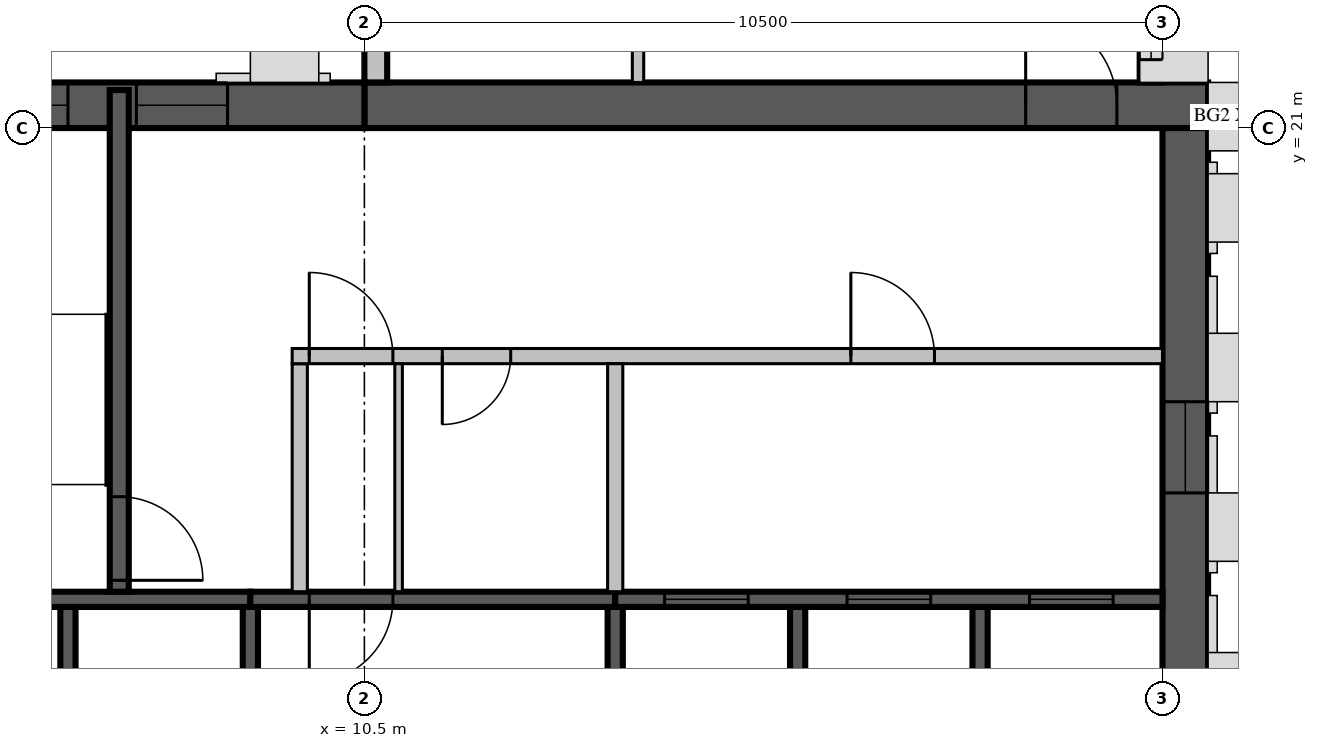
"""IFC4 building model, lengths in metres.
Left out: names, types, materials, properties, quantities, classifications, styles, units other than length and angle.
Written with IfcOpenShell. Run it as: python <this file> out.ifc"""

import sys

from ifc_helpers import new_model, si_unit, direction, frame, frame_2d, origin, place, context, subcontext, project, spatial, rectangle, extrude, source, transform, mapped, element, fill, save


model = new_model("IFC4")
c1 = context("Model", 3, precision=1e-05, world=origin(), true_north=direction((0.0, 1.0)))
c2 = subcontext(c1, "Body", "Model", "MODEL_VIEW")
j1 = project(units=[si_unit("LENGTHUNIT", "METRE"), si_unit("PLANEANGLEUNIT", "RADIAN")], contexts=[c1])
p1 = place(None, origin())
s1 = spatial("IfcSite", under=j1, at=p1, CompositionType="ELEMENT")
p2 = place(p1, origin())
s2 = spatial("IfcBuilding", under=s1, at=p2, CompositionType="ELEMENT")
p3 = place(p2, frame((0.0, 0.0, 347.5)))
s3 = spatial("IfcBuildingStorey", under=s2, at=p3, CompositionType="ELEMENT", Elevation=347.5)
m1 = source(origin(), c2, "Body", "SweptSolid", [
    extrude(rectangle(XDim=11.1, YDim=0.6, at=frame_2d((5.55, 0.0))), origin(), (0.0, 0.0, 1.0), 3.5),
])
p4 = place(p3, frame((10.5, 21.3, 0.0), z_axis=(0.0, 0.0, 1.0), x_axis=(1.0, 0.0, 0.0)))
e1 = element("IfcWall", 1, at=p4, inside=s3, PredefinedType="SHEAR", context=c2, shape_type="MappedRepresentation", body=[
    mapped(m1, transform((0.0, 0.0, 0.0), scale=1.0)),
])
m2 = source(origin(), c2, "Body", "SweptSolid", [
    extrude(rectangle(XDim=1.2, YDim=2.1, at=frame_2d((0.6, 1.05))), frame((0.0, 0.31, 0.0), z_axis=(0.0, -1.0, 0.0), x_axis=(1.0, 0.0, 0.0)), (0.0, 0.0, 1.0), 0.62),
])
p5 = place(p4, frame((8.7, 0.0, 0.0)))
e2 = element("IfcOpeningElement", 2, at=p5, cuts=e1, PredefinedType="OPENING", context=c2, shape_type="MappedRepresentation", body=[
    mapped(m2, transform((0.0, 0.0, 0.0), scale=1.0)),
])
m3 = source(origin(), c2, "Body", "SweptSolid", [
    extrude(rectangle(XDim=16.8, YDim=0.6, at=frame_2d((8.4, 0.0))), origin(), (0.0, 0.0, 1.0), 3.5),
])
p6 = place(p3, frame((21.3, 4.2, 0.0), z_axis=(0.0, 0.0, 1.0), x_axis=(0.0, 1.0, 0.0)))
e3 = element("IfcWall", 3, at=p6, inside=s3, PredefinedType="SHEAR", context=c2, shape_type="MappedRepresentation", body=[
    mapped(m3, transform((0.0, 0.0, 0.0), scale=1.0)),
])
p7 = place(p6, frame((4.2, 0.0, 0.0)))
e4 = element("IfcOpeningElement", 4, at=p7, cuts=e3, PredefinedType="OPENING", context=c2, shape_type="MappedRepresentation", body=[
    mapped(m2, transform((0.0, 0.0, 0.0), scale=1.0)),
])
m4 = source(origin(), c2, "Body", "SweptSolid", [
    extrude(rectangle(XDim=1.2, YDim=2.4, at=frame_2d((0.6, 1.2))), frame((0.0, 0.31, 0.0), z_axis=(0.0, -1.0, 0.0), x_axis=(1.0, 0.0, 0.0)), (0.0, 0.0, 1.0), 0.62),
])
p8 = place(p6, frame((12.0, 0.0, 0.6)))
e5 = element("IfcOpeningElement", 5, at=p8, cuts=e3, PredefinedType="OPENING", context=c2, shape_type="MappedRepresentation", body=[
    mapped(m4, transform((0.0, 0.0, 0.0), scale=1.0)),
])
m5 = source(origin(), c2, "Body", "SweptSolid", [
    extrude(rectangle(XDim=6.6, YDim=0.6, at=frame_2d((3.3, 0.0))), origin(), (0.0, 0.0, 1.0), 3.5),
])
p9 = place(p3, frame((3.9, 21.3, 0.0), z_axis=(0.0, 0.0, 1.0), x_axis=(1.0, 0.0, 0.0)))
e6 = element("IfcWall", 6, at=p9, inside=s3, PredefinedType="SHEAR", context=c2, shape_type="MappedRepresentation", body=[
    mapped(m5, transform((0.0, 0.0, 0.0), scale=1.0)),
])
p10 = place(p9, frame((1.5, 0.0, 0.6)))
e7 = element("IfcOpeningElement", 7, at=p10, cuts=e6, PredefinedType="OPENING", context=c2, shape_type="MappedRepresentation", body=[
    mapped(m4, transform((0.0, 0.0, 0.0), scale=1.0)),
])
p11 = place(p9, frame((3.6, 0.0, 0.6)))
e8 = element("IfcOpeningElement", 8, at=p11, cuts=e6, PredefinedType="OPENING", context=c2, shape_type="MappedRepresentation", body=[
    mapped(m4, transform((0.0, 0.0, 0.0), scale=1.0)),
])
m6 = source(origin(), c2, "Body", "SweptSolid", [
    extrude(rectangle(XDim=7.5, YDim=0.3, at=frame_2d((3.75, 0.0))), origin(), (0.0, 0.0, 1.0), 3.1),
])
p12 = place(p3, frame((20.85, 21.6, 0.0), z_axis=(0.0, 0.0, 1.0), x_axis=(0.0, 1.0, 0.0)))
e9 = element("IfcWall", 9, at=p12, inside=s3, PredefinedType="STANDARD", context=c2, shape_type="MappedRepresentation", body=[
    mapped(m6, transform((0.0, 0.0, 0.0), scale=1.0)),
])
m7 = source(origin(), c2, "Body", "SweptSolid", [
    extrude(rectangle(XDim=2.4, YDim=2.0, at=frame_2d((1.2, 1.0))), frame((0.0, 0.16, 0.0), z_axis=(0.0, -1.0, 0.0), x_axis=(1.0, 0.0, 0.0)), (0.0, 0.0, 1.0), 0.32),
])
p13 = place(p12, frame((0.3, 0.0, 0.6)))
e10 = element("IfcOpeningElement", 10, at=p13, cuts=e9, PredefinedType="OPENING", context=c2, shape_type="MappedRepresentation", body=[
    mapped(m7, transform((0.0, 0.0, 0.0), scale=1.0)),
])
m8 = source(origin(), c2, "Body", "SweptSolid", [
    extrude(rectangle(XDim=3.0, YDim=2.0, at=frame_2d((1.5, 1.0))), frame((0.0, 0.16, 0.0), z_axis=(0.0, -1.0, 0.0), x_axis=(1.0, 0.0, 0.0)), (0.0, 0.0, 1.0), 0.32),
])
p14 = place(p12, frame((4.2, 0.0, 0.6)))
e11 = element("IfcOpeningElement", 11, at=p14, cuts=e9, PredefinedType="OPENING", context=c2, shape_type="MappedRepresentation", body=[
    mapped(m8, transform((0.0, 0.0, 0.0), scale=1.0)),
])
p15 = place(p3, frame((10.65, 29.1, 0.0), z_axis=(0.0, 0.0, 1.0), x_axis=(0.0, -1.0, 0.0)))
e12 = element("IfcWall", 12, at=p15, inside=s3, PredefinedType="STANDARD", context=c2, shape_type="MappedRepresentation", body=[
    mapped(m6, transform((0.0, 0.0, 0.0), scale=1.0)),
])
m9 = source(origin(), c2, "Body", "SweptSolid", [
    extrude(rectangle(XDim=3.6, YDim=2.0, at=frame_2d((1.8, 1.0))), frame((0.0, 0.16, 0.0), z_axis=(0.0, -1.0, 0.0), x_axis=(1.0, 0.0, 0.0)), (0.0, 0.0, 1.0), 0.32),
])
p16 = place(p15, frame((3.36, 0.0, 0.6)))
e13 = element("IfcOpeningElement", 13, at=p16, cuts=e12, PredefinedType="OPENING", context=c2, shape_type="MappedRepresentation", body=[
    mapped(m9, transform((0.0, 0.0, 0.0), scale=1.0)),
])
p17 = place(p15, frame((0.48, 0.0, 0.6)))
e14 = element("IfcOpeningElement", 14, at=p17, cuts=e12, PredefinedType="OPENING", context=c2, shape_type="MappedRepresentation", body=[
    mapped(m7, transform((0.0, 0.0, 0.0), scale=1.0)),
])
m10 = source(origin(), c2, "Body", "SweptSolid", [
    extrude(rectangle(XDim=3.0, YDim=0.2, at=frame_2d((1.5, 0.0))), origin(), (0.0, 0.0, 1.0), 3.5),
])
p18 = place(p3, frame((6.6, 11.7, 0.0), z_axis=(0.0, 0.0, 1.0), x_axis=(0.0, 1.0, 0.0)))
e15 = element("IfcWall", 15, at=p18, inside=s3, PredefinedType="SOLIDWALL", context=c2, shape_type="MappedRepresentation", body=[
    mapped(m10, transform((0.0, 0.0, 0.0), scale=1.0)),
])
m11 = source(origin(), c2, "Body", "SweptSolid", [
    extrude(rectangle(XDim=3.0, YDim=0.2, at=frame_2d((1.5, 0.0))), origin(), (0.0, 0.0, 1.0), 3.1),
])
for number, where, z_axis, x_axis in (
    (16, (9.0, 11.7, 0.0), (0.0, 0.0, 1.0), (0.0, 1.0, 0.0)),
    (17, (13.8, 11.7, 0.0), (0.0, 0.0, 1.0), (0.0, 1.0, 0.0)),
):
    element("IfcWall", number, at=place(p3, frame(where, z_axis=z_axis, x_axis=x_axis)), inside=s3, PredefinedType="SOLIDWALL", context=c2, shape_type="MappedRepresentation", body=[
        mapped(m11, transform((0.0, 0.0, 0.0), scale=1.0)),
    ])
for number, where, z_axis, x_axis in (
    (18, (16.2, 11.7, 0.0), (0.0, 0.0, 1.0), (0.0, 1.0, 0.0)),
    (19, (18.6, 11.7, 0.0), (0.0, 0.0, 1.0), (0.0, 1.0, 0.0)),
):
    element("IfcWall", number, at=place(p3, frame(where, z_axis=z_axis, x_axis=x_axis)), inside=s3, PredefinedType="SOLIDWALL", context=c2, shape_type="MappedRepresentation", body=[
        mapped(m10, transform((0.0, 0.0, 0.0), scale=1.0)),
    ])
m12 = source(origin(), c2, "Body", "SweptSolid", [
    extrude(rectangle(XDim=4.8, YDim=0.2, at=frame_2d((2.4, 0.0))), origin(), (0.0, 0.0, 1.0), 3.5),
])
p19 = place(p3, frame((4.2, 14.8, 0.0), z_axis=(0.0, 0.0, 1.0), x_axis=(1.0, 0.0, 0.0)))
e20 = element("IfcWall", 20, at=p19, inside=s3, PredefinedType="SOLIDWALL", context=c2, shape_type="MappedRepresentation", body=[
    mapped(m12, transform((0.0, 0.0, 0.0), scale=1.0)),
])
m13 = source(origin(), c2, "Body", "SweptSolid", [
    extrude(rectangle(XDim=4.8, YDim=0.2, at=frame_2d((2.4, 0.0))), origin(), (0.0, 0.0, 1.0), 3.1),
])
p20 = place(p3, frame((9.0, 14.8, 0.0), z_axis=(0.0, 0.0, 1.0), x_axis=(1.0, 0.0, 0.0)))
e21 = element("IfcWall", 21, at=p20, inside=s3, PredefinedType="SOLIDWALL", context=c2, shape_type="MappedRepresentation", body=[
    mapped(m13, transform((0.0, 0.0, 0.0), scale=1.0)),
])
m14 = source(origin(), c2, "Body", "SweptSolid", [
    extrude(rectangle(XDim=1.1, YDim=2.1, at=frame_2d((0.55, 1.05))), frame((0.0, 0.11, 0.0), z_axis=(0.0, -1.0, 0.0), x_axis=(1.0, 0.0, 0.0)), (0.0, 0.0, 1.0), 0.22),
])
p21 = place(p20, frame((0.775, 0.0, 0.0)))
e22 = element("IfcOpeningElement", 22, at=p21, cuts=e21, PredefinedType="OPENING", context=c2, shape_type="MappedRepresentation", body=[
    mapped(m14, transform((0.0, 0.0, 0.0), scale=1.0)),
])
m15 = source(origin(), c2, "Body", "SweptSolid", [
    extrude(rectangle(XDim=7.2, YDim=0.2, at=frame_2d((3.6, 0.0))), origin(), (0.0, 0.0, 1.0), 3.5),
])
p22 = place(p3, frame((13.8, 14.8, 0.0), z_axis=(0.0, 0.0, 1.0), x_axis=(1.0, 0.0, 0.0)))
e23 = element("IfcWall", 23, at=p22, inside=s3, PredefinedType="SOLIDWALL", context=c2, shape_type="MappedRepresentation", body=[
    mapped(m15, transform((0.0, 0.0, 0.0), scale=1.0)),
])
p23 = place(p22, frame((0.65, 0.0, 0.0)))
e24 = element("IfcOpeningElement", 24, at=p23, cuts=e23, PredefinedType="OPENING", context=c2, shape_type="MappedRepresentation", body=[
    mapped(m14, transform((0.0, 0.0, 0.0), scale=1.0)),
])
p24 = place(p22, frame((3.05, 0.0, 0.0)))
e25 = element("IfcOpeningElement", 25, at=p24, cuts=e23, PredefinedType="OPENING", context=c2, shape_type="MappedRepresentation", body=[
    mapped(m14, transform((0.0, 0.0, 0.0), scale=1.0)),
])
p25 = place(p22, frame((5.45, 0.0, 0.0)))
e26 = element("IfcOpeningElement", 26, at=p25, cuts=e23, PredefinedType="OPENING", context=c2, shape_type="MappedRepresentation", body=[
    mapped(m14, transform((0.0, 0.0, 0.0), scale=1.0)),
])
m16 = source(origin(), c2, "Body", "SweptSolid", [
    extrude(rectangle(XDim=6.6, YDim=0.25, at=frame_2d((3.3, 0.0))), origin(), (0.0, 0.0, 1.0), 3.1),
])
p26 = place(p3, frame((7.275, 14.9, 0.0), z_axis=(0.0, 0.0, 1.0), x_axis=(0.0, 1.0, 0.0)))
e27 = element("IfcWall", 27, at=p26, inside=s3, PredefinedType="SOLIDWALL", context=c2, shape_type="MappedRepresentation", body=[
    mapped(m16, transform((0.0, 0.0, 0.0), scale=1.0)),
])
m17 = source(origin(), c2, "Body", "SweptSolid", [
    extrude(rectangle(XDim=1.1, YDim=2.1, at=frame_2d((0.55, 1.05))), frame((0.0, 0.135, 0.0), z_axis=(0.0, -1.0, 0.0), x_axis=(1.0, 0.0, 0.0)), (0.0, 0.0, 1.0), 0.27),
])
p27 = place(p26, frame((0.15, 0.0, 0.0)))
e28 = element("IfcOpeningElement", 28, at=p27, cuts=e27, PredefinedType="OPENING", context=c2, shape_type="MappedRepresentation", body=[
    mapped(m17, transform((0.0, 0.0, 0.0), scale=1.0)),
])
m18 = source(origin(), c2, "Body", "SweptSolid", [
    extrude(rectangle(XDim=3.0, YDim=0.2, at=frame_2d((1.5, 0.0))), origin(), (0.0, 0.0, 1.0), 3.1),
])
p28 = place(p3, frame((9.65, 14.9, 0.0), z_axis=(0.0, 0.0, 1.0), x_axis=(0.0, 1.0, 0.0)))
e29 = element("IfcWall", 29, at=p28, inside=s3, PredefinedType="PARTITIONING", context=c2, shape_type="MappedRepresentation", body=[
    mapped(m18, transform((0.0, 0.0, 0.0), scale=1.0)),
])
m19 = source(origin(), c2, "Body", "SweptSolid", [
    extrude(rectangle(XDim=11.45, YDim=0.2, at=frame_2d((5.725, 0.0))), origin(), (0.0, 0.0, 1.0), 3.1),
])
p29 = place(p3, frame((9.55, 18.0, 0.0), z_axis=(0.0, 0.0, 1.0), x_axis=(1.0, 0.0, 0.0)))
e30 = element("IfcWall", 30, at=p29, inside=s3, PredefinedType="PARTITIONING", context=c2, shape_type="MappedRepresentation", body=[
    mapped(m19, transform((0.0, 0.0, 0.0), scale=1.0)),
])
p30 = place(p29, frame((0.225, 0.0, 0.0)))
e31 = element("IfcOpeningElement", 31, at=p30, cuts=e30, PredefinedType="OPENING", context=c2, shape_type="MappedRepresentation", body=[
    mapped(m14, transform((0.0, 0.0, 0.0), scale=1.0)),
])
m20 = source(origin(), c2, "Body", "SweptSolid", [
    extrude(rectangle(XDim=0.9, YDim=2.1, at=frame_2d((0.45, 1.05))), frame((0.0, 0.11, 0.0), z_axis=(0.0, -1.0, 0.0), x_axis=(1.0, 0.0, 0.0)), (0.0, 0.0, 1.0), 0.22),
])
p31 = place(p29, frame((1.975, 0.0, 0.0)))
e32 = element("IfcOpeningElement", 32, at=p31, cuts=e30, PredefinedType="OPENING", context=c2, shape_type="MappedRepresentation", body=[
    mapped(m20, transform((0.0, 0.0, 0.0), scale=1.0)),
])
p32 = place(p29, frame((7.35, 0.0, 0.0)))
e33 = element("IfcOpeningElement", 33, at=p32, cuts=e30, PredefinedType="OPENING", context=c2, shape_type="MappedRepresentation", body=[
    mapped(m14, transform((0.0, 0.0, 0.0), scale=1.0)),
])
p33 = place(p3, frame((13.8, 14.9, 0.0), z_axis=(0.0, 0.0, 1.0), x_axis=(0.0, 1.0, 0.0)))
e34 = element("IfcWall", 34, at=p33, inside=s3, PredefinedType="PARTITIONING", context=c2, shape_type="MappedRepresentation", body=[
    mapped(m18, transform((0.0, 0.0, 0.0), scale=1.0)),
])
m21 = source(origin(), c2, "Body", "SweptSolid", [
    extrude(rectangle(XDim=3.0, YDim=0.1, at=frame_2d((1.5, 0.0))), origin(), (0.0, 0.0, 1.0), 3.1),
])
p34 = place(p3, frame((10.95, 14.9, 0.0), z_axis=(0.0, 0.0, 1.0), x_axis=(0.0, 1.0, 0.0)))
e35 = element("IfcWall", 35, at=p34, inside=s3, PredefinedType="PARTITIONING", context=c2, shape_type="MappedRepresentation", body=[
    mapped(m21, transform((0.0, 0.0, 0.0), scale=1.0)),
])
m22 = source(origin(), c2, "Body", "SweptSolid", [
    extrude(rectangle(XDim=7.725, YDim=0.15, at=frame_2d((3.862, 0.0))), origin(), (0.0, 0.0, 1.0), 3.1),
])
p35 = place(p3, frame((14.1, 29.325, 0.0), z_axis=(0.0, 0.0, 1.0), x_axis=(0.0, -1.0, 0.0)))
e36 = element("IfcWall", 36, at=p35, inside=s3, PredefinedType="PARTITIONING", context=c2, shape_type="MappedRepresentation", body=[
    mapped(m22, transform((0.0, 0.0, 0.0), scale=1.0)),
])
m23 = source(origin(), c2, "Body", "SweptSolid", [
    extrude(rectangle(XDim=2.2, YDim=2.1, at=frame_2d((1.1, 1.05))), frame((0.0, 0.085, 0.0), z_axis=(0.0, -1.0, 0.0), x_axis=(1.0, 0.0, 0.0)), (0.0, 0.0, 1.0), 0.17),
])
p36 = place(p35, frame((4.925, 0.0, 0.0)))
e37 = element("IfcOpeningElement", 37, at=p36, cuts=e36, PredefinedType="OPENING", context=c2, shape_type="MappedRepresentation", body=[
    mapped(m23, transform((0.0, 0.0, 0.0), scale=1.0)),
])
m24 = source(origin(), c2, "Body", "SweptSolid", [
    extrude(rectangle(XDim=2.4, YDim=2.0, at=frame_2d((1.2, 1.0))), frame((0.0, 0.03, 0.0), z_axis=(0.0, -1.0, 0.0), x_axis=(1.0, 0.0, 0.0)), (0.0, 0.0, 1.0), 0.06),
])
p37 = place(p13, origin())
e38 = element("IfcWindow", 38, at=p37, inside=s3, PartitioningType="SINGLE_PANEL", PredefinedType="WINDOW", context=c2, shape_type="MappedRepresentation", body=[
    mapped(m24, transform((0.0, 0.0, 0.0), scale=1.0)),
])
fill(e10, e38)
m25 = source(origin(), c2, "Body", "SweptSolid", [
    extrude(rectangle(XDim=1.1, YDim=2.1, at=frame_2d((0.55, 1.05))), frame((0.0, 0.025, 0.0), z_axis=(0.0, -1.0, 0.0), x_axis=(1.0, 0.0, 0.0)), (0.0, 0.0, 1.0), 0.05),
])
p38 = place(p21, origin())
e39 = element("IfcDoor", 39, at=p38, inside=s3, OperationType="SINGLE_SWING_RIGHT", PredefinedType="DOOR", context=c2, shape_type="MappedRepresentation", body=[
    mapped(m25, transform((0.0, 0.0, 0.0), scale=1.0)),
])
fill(e22, e39)
p39 = place(p23, origin())
e40 = element("IfcDoor", 40, at=p39, inside=s3, OperationType="SLIDING_TO_LEFT", PredefinedType="DOOR", context=c2, shape_type="MappedRepresentation", body=[
    mapped(m25, transform((0.0, 0.0, 0.0), scale=1.0)),
])
fill(e24, e40)
p40 = place(p24, origin())
e41 = element("IfcDoor", 41, at=p40, inside=s3, OperationType="SLIDING_TO_LEFT", PredefinedType="DOOR", context=c2, shape_type="MappedRepresentation", body=[
    mapped(m25, transform((0.0, 0.0, 0.0), scale=1.0)),
])
fill(e25, e41)
p41 = place(p25, origin())
e42 = element("IfcDoor", 42, at=p41, inside=s3, OperationType="SLIDING_TO_LEFT", PredefinedType="DOOR", context=c2, shape_type="MappedRepresentation", body=[
    mapped(m25, transform((0.0, 0.0, 0.0), scale=1.0)),
])
fill(e26, e42)
p42 = place(p27, origin())
e43 = element("IfcDoor", 43, at=p42, inside=s3, OperationType="SINGLE_SWING_RIGHT", PredefinedType="DOOR", context=c2, shape_type="MappedRepresentation", body=[
    mapped(m25, transform((0.0, 0.0, 0.0), scale=1.0)),
])
fill(e28, e43)
p43 = place(p30, origin())
e44 = element("IfcDoor", 44, at=p43, inside=s3, OperationType="SINGLE_SWING_LEFT", PredefinedType="DOOR", context=c2, shape_type="MappedRepresentation", body=[
    mapped(m25, transform((0.0, 0.0, 0.0), scale=1.0)),
])
fill(e31, e44)
m26 = source(origin(), c2, "Body", "SweptSolid", [
    extrude(rectangle(XDim=0.9, YDim=2.1, at=frame_2d((0.45, 1.05))), frame((0.0, 0.025, 0.0), z_axis=(0.0, -1.0, 0.0), x_axis=(1.0, 0.0, 0.0)), (0.0, 0.0, 1.0), 0.05),
])
p44 = place(p31, origin())
e45 = element("IfcDoor", 45, at=p44, inside=s3, OperationType="SINGLE_SWING_RIGHT", PredefinedType="DOOR", context=c2, shape_type="MappedRepresentation", body=[
    mapped(m26, transform((0.0, 0.0, 0.0), scale=1.0)),
])
fill(e32, e45)
p45 = place(p32, origin())
e46 = element("IfcDoor", 46, at=p45, inside=s3, OperationType="SINGLE_SWING_LEFT", PredefinedType="DOOR", context=c2, shape_type="MappedRepresentation", body=[
    mapped(m25, transform((0.0, 0.0, 0.0), scale=1.0)),
])
fill(e33, e46)
m27 = source(origin(), c2, "Body", "SweptSolid", [
    extrude(rectangle(XDim=1.2, YDim=2.1, at=frame_2d((0.6, 1.05))), frame((0.0, 0.025, 0.0), z_axis=(0.0, -1.0, 0.0), x_axis=(1.0, 0.0, 0.0)), (0.0, 0.0, 1.0), 0.05),
])
p46 = place(p5, origin())
e47 = element("IfcDoor", 47, at=p46, inside=s3, OperationType="SINGLE_SWING_LEFT", PredefinedType="DOOR", context=c2, shape_type="MappedRepresentation", body=[
    mapped(m27, transform((0.0, 0.0, 0.0), scale=1.0)),
])
fill(e2, e47)
m28 = source(origin(), c2, "Body", "SweptSolid", [
    extrude(rectangle(XDim=1.2, YDim=2.4, at=frame_2d((0.6, 1.2))), frame((0.0, 0.03, 0.0), z_axis=(0.0, -1.0, 0.0), x_axis=(1.0, 0.0, 0.0)), (0.0, 0.0, 1.0), 0.06),
])
p47 = place(p8, origin())
e48 = element("IfcWindow", 48, at=p47, inside=s3, PartitioningType="SINGLE_PANEL", PredefinedType="WINDOW", context=c2, shape_type="MappedRepresentation", body=[
    mapped(m28, transform((0.0, 0.0, 0.0), scale=1.0)),
])
fill(e5, e48)
p48 = place(p10, origin())
e49 = element("IfcWindow", 49, at=p48, inside=s3, PartitioningType="SINGLE_PANEL", PredefinedType="WINDOW", context=c2, shape_type="MappedRepresentation", body=[
    mapped(m28, transform((0.0, 0.0, 0.0), scale=1.0)),
])
fill(e7, e49)
p49 = place(p11, origin())
e50 = element("IfcWindow", 50, at=p49, inside=s3, PartitioningType="SINGLE_PANEL", PredefinedType="WINDOW", context=c2, shape_type="MappedRepresentation", body=[
    mapped(m28, transform((0.0, 0.0, 0.0), scale=1.0)),
])
fill(e8, e50)
save(model, sys.argv[1])
